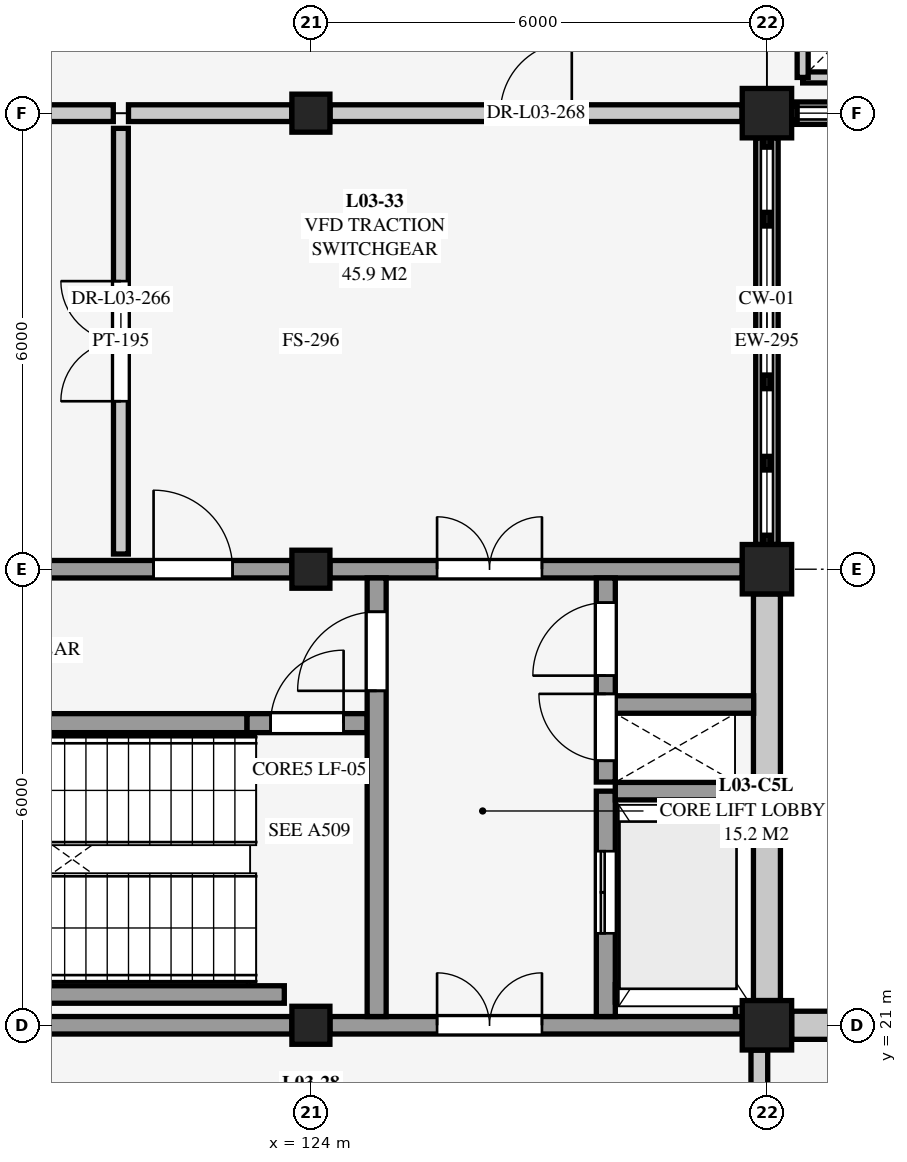
"""IFC4 building model, lengths in metres.
Left out: names, types, materials, properties, quantities, classifications, styles, units other than length and angle.
Written with IfcOpenShell. Run it as: python <this file> out.ifc"""

import sys

from ifc_helpers import new_model, si_unit, direction, frame, frame_2d, origin, origin_2d, place, context, subcontext, project, spatial, rectangle, extrude, element, fill, save


model = new_model("IFC4")
c1 = context("Model", 3, precision=1e-05, world=origin(), true_north=direction((0.0, 1.0)))
c2 = subcontext(c1, "Body", "Model", "MODEL_VIEW")
j1 = project(units=[si_unit("LENGTHUNIT", "METRE"), si_unit("PLANEANGLEUNIT", "RADIAN")], contexts=[c1])
p1 = place(None, origin())
s1 = spatial("IfcSite", under=j1, at=p1, CompositionType="ELEMENT")
p2 = place(p1, origin())
s2 = spatial("IfcBuilding", under=s1, at=p2, CompositionType="ELEMENT")
p3 = place(p2, frame((0.0, 0.0, 9.0)))
s3 = spatial("IfcBuildingStorey", under=s2, at=p3, CompositionType="ELEMENT", Elevation=9.0)
for number, where, z_axis, x_axis in (
    (1, (124.0, 21.0, 0.0), (0.0, 0.0, 1.0), (1.0, 0.0, 0.0)),
    (2, (124.0, 27.0, 0.0), (0.0, 0.0, 1.0), (1.0, 0.0, 0.0)),
    (3, (124.0, 33.0, 0.0), (0.0, 0.0, 1.0), (1.0, 0.0, 0.0)),
):
    element("IfcColumn", number, at=place(p3, frame(where, z_axis=z_axis, x_axis=x_axis)), inside=s3, PredefinedType="COLUMN", context=c2, shape_type="SweptSolid", body=[
        extrude(rectangle(XDim=0.5, YDim=0.5, at=origin_2d()), origin(), (0.0, 0.0, 1.0), 4.5),
    ])
for number, where, z_axis, x_axis in (
    (4, (130.0, 21.0, 0.0), (0.0, 0.0, 1.0), (1.0, 0.0, 0.0)),
    (5, (130.0, 27.0, 0.0), (0.0, 0.0, 1.0), (1.0, 0.0, 0.0)),
    (6, (130.0, 33.0, 0.0), (0.0, 0.0, 1.0), (1.0, 0.0, 0.0)),
):
    element("IfcColumn", number, at=place(p3, frame(where, z_axis=z_axis, x_axis=x_axis)), inside=s3, PredefinedType="COLUMN", context=c2, shape_type="SweptSolid", body=[
        extrude(rectangle(XDim=0.65, YDim=0.65, at=origin_2d()), origin(), (0.0, 0.0, 1.0), 4.5),
    ])
p4 = place(p3, frame((130.325, 21.0, 0.0), z_axis=(0.0, 0.0, 1.0), x_axis=(1.0, 0.0, 0.0)))
e7 = element("IfcWall", 7, at=p4, inside=s3, PredefinedType="SOLIDWALL", context=c2, shape_type="SweptSolid", body=[
    extrude(rectangle(XDim=5.375, YDim=0.37, at=frame_2d((2.688, 0.0))), origin(), (0.0, 0.0, 1.0), 3.778),
])
p5 = place(p4, frame((1.962, 0.0, 0.75)))
e8 = element("IfcOpeningElement", 8, at=p5, cuts=e7, PredefinedType="OPENING", context=c2, shape_type="SweptSolid", body=[
    extrude(rectangle(XDim=1.45, YDim=2.25, at=frame_2d((0.725, 1.125))), frame((0.0, 0.195, 0.0), z_axis=(0.0, -1.0, 0.0), x_axis=(1.0, 0.0, 0.0)), (0.0, 0.0, 1.0), 0.39),
])
p6 = place(p3, frame((130.0, 26.675, 0.0), z_axis=(0.0, 0.0, 1.0), x_axis=(0.0, -1.0, 0.0)))
e9 = element("IfcWall", 9, at=p6, inside=s3, PredefinedType="SOLIDWALL", context=c2, shape_type="SweptSolid", body=[
    extrude(rectangle(XDim=5.35, YDim=0.355, at=frame_2d((2.675, 0.0))), origin(), (0.0, 0.0, 1.0), 3.778),
])
p7 = place(p3, frame((130.0, 32.675, 0.0), z_axis=(0.0, 0.0, 1.0), x_axis=(0.0, -1.0, 0.0)))
e10 = element("IfcWall", 10, at=p7, inside=s3, PredefinedType="SOLIDWALL", context=c2, shape_type="SweptSolid", body=[
    extrude(rectangle(XDim=5.35, YDim=0.295, at=frame_2d((2.675, 0.0))), origin(), (0.0, 0.0, 1.0), 0.16),
])
p8 = place(p3, frame((135.675, 33.0, 0.0), z_axis=(0.0, 0.0, 1.0), x_axis=(-1.0, 0.0, 0.0)))
e11 = element("IfcWall", 11, at=p8, inside=s3, PredefinedType="SOLIDWALL", context=c2, shape_type="SweptSolid", body=[
    extrude(rectangle(XDim=5.35, YDim=0.295, at=frame_2d((2.675, 0.0))), origin(), (0.0, 0.0, 1.0), 0.21),
])
for number, where, z_axis, x_axis in (
    (12, (130.47, 33.47, 0.0), (0.0, 0.0, 1.0), (1.0, 0.0, 0.0)),
    (13, (130.47, 34.43, 0.0), (0.0, 0.0, 1.0), (0.0, -1.0, 0.0)),
):
    element("IfcWall", number, at=place(p3, frame(where, z_axis=z_axis, x_axis=x_axis)), inside=s3, PredefinedType="PARTITIONING", context=c2, shape_type="SweptSolid", body=[
        extrude(rectangle(XDim=0.96, YDim=0.145, at=frame_2d((0.48, 0.0))), origin(), (0.0, 0.0, 1.0), 4.3),
    ])
p9 = place(p3, frame((118.275, 21.0, 0.0), z_axis=(0.0, 0.0, 1.0), x_axis=(1.0, 0.0, 0.0)))
e14 = element("IfcWall", 14, at=p9, inside=s3, PredefinedType="SHEAR", context=c2, shape_type="SweptSolid", body=[
    extrude(rectangle(XDim=5.475, YDim=0.23, at=frame_2d((2.738, 0.0))), origin(), (0.0, 0.0, 1.0), 4.185),
])
p10 = place(p3, frame((124.25, 21.0, 0.0), z_axis=(0.0, 0.0, 1.0), x_axis=(1.0, 0.0, 0.0)))
e15 = element("IfcWall", 15, at=p10, inside=s3, PredefinedType="SHEAR", context=c2, shape_type="SweptSolid", body=[
    extrude(rectangle(XDim=5.425, YDim=0.23, at=frame_2d((2.712, 0.0))), origin(), (0.0, 0.0, 1.0), 4.185),
])
p11 = place(p10, frame((1.41, 0.0, 0.0)))
e16 = element("IfcOpeningElement", 16, at=p11, cuts=e15, PredefinedType="OPENING", context=c2, shape_type="SweptSolid", body=[
    extrude(rectangle(XDim=1.38, YDim=2.16, at=frame_2d((0.69, 1.08))), frame((0.0, 0.125, 0.0), z_axis=(0.0, -1.0, 0.0), x_axis=(1.0, 0.0, 0.0)), (0.0, 0.0, 1.0), 0.25),
])
p12 = place(p3, frame((118.275, 27.0, 0.0), z_axis=(0.0, 0.0, 1.0), x_axis=(1.0, 0.0, 0.0)))
e17 = element("IfcWall", 17, at=p12, inside=s3, PredefinedType="SHEAR", context=c2, shape_type="SweptSolid", body=[
    extrude(rectangle(XDim=5.475, YDim=0.23, at=frame_2d((2.738, 0.0))), origin(), (0.0, 0.0, 1.0), 4.185),
])
p13 = place(p12, frame((3.655, 0.0, 0.0)))
e18 = element("IfcOpeningElement", 18, at=p13, cuts=e17, PredefinedType="OPENING", context=c2, shape_type="SweptSolid", body=[
    extrude(rectangle(XDim=1.04, YDim=2.14, at=frame_2d((0.52, 1.07))), frame((0.0, 0.125, 0.0), z_axis=(0.0, -1.0, 0.0), x_axis=(1.0, 0.0, 0.0)), (0.0, 0.0, 1.0), 0.25),
])
p14 = place(p3, frame((124.25, 27.0, 0.0), z_axis=(0.0, 0.0, 1.0), x_axis=(1.0, 0.0, 0.0)))
e19 = element("IfcWall", 19, at=p14, inside=s3, PredefinedType="SHEAR", context=c2, shape_type="SweptSolid", body=[
    extrude(rectangle(XDim=5.425, YDim=0.23, at=frame_2d((2.712, 0.0))), origin(), (0.0, 0.0, 1.0), 4.185),
])
p15 = place(p14, frame((1.41, 0.0, 0.0)))
e20 = element("IfcOpeningElement", 20, at=p15, cuts=e19, PredefinedType="OPENING", context=c2, shape_type="SweptSolid", body=[
    extrude(rectangle(XDim=1.38, YDim=2.16, at=frame_2d((0.69, 1.08))), frame((0.0, 0.125, 0.0), z_axis=(0.0, -1.0, 0.0), x_axis=(1.0, 0.0, 0.0)), (0.0, 0.0, 1.0), 0.25),
])
p16 = place(p3, frame((118.52, 21.405, 0.0), z_axis=(0.0, 0.0, 1.0), x_axis=(1.0, 0.0, 0.0)))
e21 = element("IfcWall", 21, at=p16, inside=s3, PredefinedType="SHEAR", context=c2, shape_type="SweptSolid", body=[
    extrude(rectangle(XDim=5.13, YDim=0.23, at=frame_2d((2.565, 0.0))), origin(), (0.0, 0.0, 1.0), 4.5),
])
p17 = place(p3, frame((118.29, 24.975, 0.0), z_axis=(0.0, 0.0, 1.0), x_axis=(1.0, 0.0, 0.0)))
e22 = element("IfcWall", 22, at=p17, inside=s3, PredefinedType="SHEAR", context=c2, shape_type="SweptSolid", body=[
    extrude(rectangle(XDim=4.87, YDim=0.25, at=frame_2d((2.435, 0.0))), origin(), (0.0, 0.0, 1.0), 4.5),
])
p18 = place(p3, frame((123.16, 24.975, 0.0), z_axis=(0.0, 0.0, 1.0), x_axis=(1.0, 0.0, 0.0)))
e23 = element("IfcWall", 23, at=p18, inside=s3, PredefinedType="SHEAR", context=c2, shape_type="SweptSolid", body=[
    extrude(rectangle(XDim=1.58, YDim=0.25, at=frame_2d((0.79, 0.0))), origin(), (0.0, 0.0, 1.0), 4.185),
])
p19 = place(p18, frame((0.31, 0.0, 0.0)))
e24 = element("IfcOpeningElement", 24, at=p19, cuts=e23, PredefinedType="OPENING", context=c2, shape_type="SweptSolid", body=[
    extrude(rectangle(XDim=0.96, YDim=2.12, at=frame_2d((0.48, 1.06))), frame((0.0, 0.135, 0.0), z_axis=(0.0, -1.0, 0.0), x_axis=(1.0, 0.0, 0.0)), (0.0, 0.0, 1.0), 0.27),
])
p20 = place(p3, frame((124.865, 21.115, 0.0), z_axis=(0.0, 0.0, 1.0), x_axis=(0.0, 1.0, 0.0)))
e25 = element("IfcWall", 25, at=p20, inside=s3, PredefinedType="SHEAR", context=c2, shape_type="SweptSolid", body=[
    extrude(rectangle(XDim=5.77, YDim=0.25, at=frame_2d((2.885, 0.0))), origin(), (0.0, 0.0, 1.0), 4.185),
])
p21 = place(p20, frame((4.285, 0.0, 0.0)))
e26 = element("IfcOpeningElement", 26, at=p21, cuts=e25, PredefinedType="OPENING", context=c2, shape_type="SweptSolid", body=[
    extrude(rectangle(XDim=1.04, YDim=2.14, at=frame_2d((0.52, 1.07))), frame((0.0, 0.135, 0.0), z_axis=(0.0, -1.0, 0.0), x_axis=(1.0, 0.0, 0.0)), (0.0, 0.0, 1.0), 0.27),
])
p22 = place(p3, frame((127.88, 21.115, 0.0), z_axis=(0.0, 0.0, 1.0), x_axis=(0.0, 1.0, 0.0)))
e27 = element("IfcWall", 27, at=p22, inside=s3, PredefinedType="SHEAR", context=c2, shape_type="SweptSolid", body=[
    extrude(rectangle(XDim=2.965, YDim=0.25, at=frame_2d((1.482, 0.0))), origin(), (0.0, 0.0, 1.0), 4.5),
])
p23 = place(p22, frame((1.095, 0.0, 0.0)))
e28 = element("IfcOpeningElement", 28, at=p23, cuts=e27, PredefinedType="OPENING", context=c2, shape_type="SweptSolid", body=[
    extrude(rectangle(XDim=1.08, YDim=2.15, at=frame_2d((0.54, 1.075))), frame((0.0, 0.135, 0.0), z_axis=(0.0, -1.0, 0.0), x_axis=(1.0, 0.0, 0.0)), (0.0, 0.0, 1.0), 0.27),
])
p24 = place(p3, frame((128.005, 21.42, 0.0), z_axis=(0.0, 0.0, 1.0), x_axis=(1.0, 0.0, 0.0)))
e29 = element("IfcWall", 29, at=p24, inside=s3, PredefinedType="SHEAR", context=c2, shape_type="SweptSolid", body=[
    extrude(rectangle(XDim=1.58, YDim=0.23, at=frame_2d((0.79, 0.0))), origin(), (0.0, 0.0, 1.0), 4.5),
])
p25 = place(p3, frame((129.7, 21.115, 0.0), z_axis=(0.0, 0.0, 1.0), x_axis=(0.0, 1.0, 0.0)))
e30 = element("IfcWall", 30, at=p25, inside=s3, PredefinedType="SHEAR", context=c2, shape_type="SweptSolid", body=[
    extrude(rectangle(XDim=2.965, YDim=0.23, at=frame_2d((1.482, 0.0))), origin(), (0.0, 0.0, 1.0), 4.5),
])
p26 = place(p3, frame((128.005, 24.08, 0.0), z_axis=(0.0, 0.0, 1.0), x_axis=(1.0, 0.0, 0.0)))
e31 = element("IfcWall", 31, at=p26, inside=s3, PredefinedType="SHEAR", context=c2, shape_type="SweptSolid", body=[
    extrude(rectangle(XDim=1.58, YDim=0.23, at=frame_2d((0.79, 0.0))), origin(), (0.0, 0.0, 1.0), 4.5),
])
p27 = place(p3, frame((127.88, 24.2, 0.0), z_axis=(0.0, 0.0, 1.0), x_axis=(0.0, 1.0, 0.0)))
e32 = element("IfcWall", 32, at=p27, inside=s3, PredefinedType="SHEAR", context=c2, shape_type="SweptSolid", body=[
    extrude(rectangle(XDim=2.685, YDim=0.25, at=frame_2d((1.343, 0.0))), origin(), (0.0, 0.0, 1.0), 4.185),
])
p28 = place(p27, frame((0.28, 0.0, 0.0)))
e33 = element("IfcOpeningElement", 33, at=p28, cuts=e32, PredefinedType="OPENING", context=c2, shape_type="SweptSolid", body=[
    extrude(rectangle(XDim=0.88, YDim=2.08, at=frame_2d((0.44, 1.04))), frame((0.0, 0.135, 0.0), z_axis=(0.0, -1.0, 0.0), x_axis=(1.0, 0.0, 0.0)), (0.0, 0.0, 1.0), 0.27),
])
p29 = place(p27, frame((1.4, 0.0, 0.0)))
e34 = element("IfcOpeningElement", 34, at=p29, cuts=e32, PredefinedType="OPENING", context=c2, shape_type="SweptSolid", body=[
    extrude(rectangle(XDim=0.96, YDim=2.12, at=frame_2d((0.48, 1.06))), frame((0.0, 0.135, 0.0), z_axis=(0.0, -1.0, 0.0), x_axis=(1.0, 0.0, 0.0)), (0.0, 0.0, 1.0), 0.27),
])
p30 = place(p3, frame((128.005, 25.22, 0.0), z_axis=(0.0, 0.0, 1.0), x_axis=(1.0, 0.0, 0.0)))
e35 = element("IfcWall", 35, at=p30, inside=s3, PredefinedType="SHEAR", context=c2, shape_type="SweptSolid", body=[
    extrude(rectangle(XDim=1.82, YDim=0.23, at=frame_2d((0.91, 0.0))), origin(), (0.0, 0.0, 1.0), 4.185),
])
p31 = place(p3, frame((129.9, 17.8, 0.0), z_axis=(0.0, 0.0, 1.0), x_axis=(0.0, 1.0, 0.0)))
e36 = element("IfcWall", 36, at=p31, inside=s3, PredefinedType="SOLIDWALL", context=c2, shape_type="SweptSolid", body=[
    extrude(rectangle(XDim=2.873, YDim=0.22, at=frame_2d((1.437, 0.0))), origin(), (0.0, 0.0, 1.0), 4.24),
])
p32 = place(p31, frame((0.967, 0.0, 0.0)))
e37 = element("IfcOpeningElement", 37, at=p32, cuts=e36, PredefinedType="OPENING", context=c2, shape_type="SweptSolid", body=[
    extrude(rectangle(XDim=0.94, YDim=2.1, at=frame_2d((0.47, 1.05))), frame((0.0, 0.12, 0.0), z_axis=(0.0, -1.0, 0.0), x_axis=(1.0, 0.0, 0.0)), (0.0, 0.0, 1.0), 0.24),
])
p33 = place(p3, frame((121.5, 27.2, 0.0), z_axis=(0.0, 0.0, 1.0), x_axis=(0.0, 1.0, 0.0)))
e38 = element("IfcWall", 38, at=p33, inside=s3, PredefinedType="PARTITIONING", context=c2, shape_type="SweptSolid", body=[
    extrude(rectangle(XDim=5.6, YDim=0.195, at=frame_2d((2.8, 0.0))), origin(), (0.0, 0.0, 1.0), 4.185),
])
p34 = place(p33, frame((2.01, 0.0, 0.0)))
e39 = element("IfcOpeningElement", 39, at=p34, cuts=e38, PredefinedType="OPENING", context=c2, shape_type="SweptSolid", body=[
    extrude(rectangle(XDim=1.58, YDim=2.2, at=frame_2d((0.79, 1.1))), frame((0.0, 0.108, 0.0), z_axis=(0.0, -1.0, 0.0), x_axis=(1.0, 0.0, 0.0)), (0.0, 0.0, 1.0), 0.215),
])
p35 = place(p3, frame((118.277, 33.0, 0.0), z_axis=(0.0, 0.0, 1.0), x_axis=(1.0, 0.0, 0.0)))
e40 = element("IfcWall", 40, at=p35, inside=s3, PredefinedType="SOLIDWALL", context=c2, shape_type="SweptSolid", body=[
    extrude(rectangle(XDim=3.123, YDim=0.22, at=frame_2d((1.562, 0.0))), origin(), (0.0, 0.0, 1.0), 3.568),
])
p36 = place(p35, frame((1.092, 0.0, 0.0)))
e41 = element("IfcOpeningElement", 41, at=p36, cuts=e40, PredefinedType="OPENING", context=c2, shape_type="SweptSolid", body=[
    extrude(rectangle(XDim=0.94, YDim=2.1, at=frame_2d((0.47, 1.05))), frame((0.0, 0.12, 0.0), z_axis=(0.0, -1.0, 0.0), x_axis=(1.0, 0.0, 0.0)), (0.0, 0.0, 1.0), 0.24),
])
p37 = place(p3, frame((124.252, 33.0, 0.0), z_axis=(0.0, 0.0, 1.0), x_axis=(1.0, 0.0, 0.0)))
e42 = element("IfcWall", 42, at=p37, inside=s3, PredefinedType="SOLIDWALL", context=c2, shape_type="SweptSolid", body=[
    extrude(rectangle(XDim=5.421, YDim=0.22, at=frame_2d((2.71, 0.0))), origin(), (0.0, 0.0, 1.0), 3.568),
])
p38 = place(p37, frame((2.24, 0.0, 0.0)))
e43 = element("IfcOpeningElement", 43, at=p38, cuts=e42, PredefinedType="OPENING", context=c2, shape_type="SweptSolid", body=[
    extrude(rectangle(XDim=0.94, YDim=2.1, at=frame_2d((0.47, 1.05))), frame((0.0, 0.12, 0.0), z_axis=(0.0, -1.0, 0.0), x_axis=(1.0, 0.0, 0.0)), (0.0, 0.0, 1.0), 0.24),
])
p39 = place(p3, frame((121.6, 33.0, 0.0), z_axis=(0.0, 0.0, 1.0), x_axis=(1.0, 0.0, 0.0)))
e44 = element("IfcWall", 44, at=p39, inside=s3, PredefinedType="SOLIDWALL", context=c2, shape_type="SweptSolid", body=[
    extrude(rectangle(XDim=2.148, YDim=0.22, at=frame_2d((1.074, 0.0))), origin(), (0.0, 0.0, 1.0), 3.568),
])
p40 = place(p11, origin())
e45 = element("IfcDoor", 45, at=p40, inside=s3, OperationType="DOUBLE_DOOR_SINGLE_SWING", PredefinedType="DOOR", context=c2, shape_type="SweptSolid", body=[
    extrude(rectangle(XDim=1.38, YDim=2.16, at=frame_2d((0.69, 1.08))), frame((0.0, 0.025, 0.0), z_axis=(0.0, -1.0, 0.0), x_axis=(1.0, 0.0, 0.0)), (0.0, 0.0, 1.0), 0.05),
])
fill(e16, e45)
p41 = place(p13, origin())
e46 = element("IfcDoor", 46, at=p41, inside=s3, OperationType="SINGLE_SWING_LEFT", PredefinedType="DOOR", context=c2, shape_type="SweptSolid", body=[
    extrude(rectangle(XDim=1.04, YDim=2.14, at=frame_2d((0.52, 1.07))), frame((0.0, 0.025, 0.0), z_axis=(0.0, -1.0, 0.0), x_axis=(1.0, 0.0, 0.0)), (0.0, 0.0, 1.0), 0.05),
])
fill(e18, e46)
p42 = place(p15, origin())
e47 = element("IfcDoor", 47, at=p42, inside=s3, OperationType="DOUBLE_DOOR_SINGLE_SWING", PredefinedType="DOOR", context=c2, shape_type="SweptSolid", body=[
    extrude(rectangle(XDim=1.38, YDim=2.16, at=frame_2d((0.69, 1.08))), frame((0.0, 0.025, 0.0), z_axis=(0.0, -1.0, 0.0), x_axis=(1.0, 0.0, 0.0)), (0.0, 0.0, 1.0), 0.05),
])
fill(e20, e47)
p43 = place(p19, origin())
e48 = element("IfcDoor", 48, at=p43, inside=s3, OperationType="SINGLE_SWING_RIGHT", PredefinedType="DOOR", context=c2, shape_type="SweptSolid", body=[
    extrude(rectangle(XDim=0.96, YDim=2.12, at=frame_2d((0.48, 1.06))), frame((0.0, 0.025, 0.0), z_axis=(0.0, -1.0, 0.0), x_axis=(1.0, 0.0, 0.0)), (0.0, 0.0, 1.0), 0.05),
])
fill(e24, e48)
p44 = place(p21, origin())
e49 = element("IfcDoor", 49, at=p44, inside=s3, OperationType="SINGLE_SWING_LEFT", PredefinedType="DOOR", context=c2, shape_type="SweptSolid", body=[
    extrude(rectangle(XDim=1.04, YDim=2.14, at=frame_2d((0.52, 1.07))), frame((0.0, 0.025, 0.0), z_axis=(0.0, -1.0, 0.0), x_axis=(1.0, 0.0, 0.0)), (0.0, 0.0, 1.0), 0.05),
])
fill(e26, e49)
p45 = place(p23, origin())
e50 = element("IfcDoor", 50, at=p45, inside=s3, OperationType="DOUBLE_DOOR_SLIDING", PredefinedType="DOOR", context=c2, shape_type="SweptSolid", body=[
    extrude(rectangle(XDim=1.08, YDim=2.15, at=frame_2d((0.54, 1.075))), frame((0.0, 0.025, 0.0), z_axis=(0.0, -1.0, 0.0), x_axis=(1.0, 0.0, 0.0)), (0.0, 0.0, 1.0), 0.05),
])
fill(e28, e50)
p46 = place(p28, origin())
e51 = element("IfcDoor", 51, at=p46, inside=s3, OperationType="SINGLE_SWING_RIGHT", PredefinedType="DOOR", context=c2, shape_type="SweptSolid", body=[
    extrude(rectangle(XDim=0.88, YDim=2.08, at=frame_2d((0.44, 1.04))), frame((0.0, 0.025, 0.0), z_axis=(0.0, -1.0, 0.0), x_axis=(1.0, 0.0, 0.0)), (0.0, 0.0, 1.0), 0.05),
])
fill(e33, e51)
p47 = place(p29, origin())
e52 = element("IfcDoor", 52, at=p47, inside=s3, OperationType="SINGLE_SWING_LEFT", PredefinedType="DOOR", context=c2, shape_type="SweptSolid", body=[
    extrude(rectangle(XDim=0.96, YDim=2.12, at=frame_2d((0.48, 1.06))), frame((0.0, 0.025, 0.0), z_axis=(0.0, -1.0, 0.0), x_axis=(1.0, 0.0, 0.0)), (0.0, 0.0, 1.0), 0.05),
])
fill(e34, e52)
p48 = place(p34, origin())
e53 = element("IfcDoor", 53, at=p48, inside=s3, OperationType="DOUBLE_DOOR_SINGLE_SWING", PredefinedType="DOOR", context=c2, shape_type="SweptSolid", body=[
    extrude(rectangle(XDim=1.58, YDim=2.2, at=frame_2d((0.79, 1.1))), frame((0.0, 0.025, 0.0), z_axis=(0.0, -1.0, 0.0), x_axis=(1.0, 0.0, 0.0)), (0.0, 0.0, 1.0), 0.05),
])
fill(e39, e53)
p49 = place(p38, origin())
e54 = element("IfcDoor", 54, at=p49, inside=s3, OperationType="SINGLE_SWING_RIGHT", PredefinedType="DOOR", context=c2, shape_type="SweptSolid", body=[
    extrude(rectangle(XDim=0.94, YDim=2.1, at=frame_2d((0.47, 1.05))), frame((0.0, 0.025, 0.0), z_axis=(0.0, -1.0, 0.0), x_axis=(1.0, 0.0, 0.0)), (0.0, 0.0, 1.0), 0.05),
])
fill(e43, e54)
save(model, sys.argv[1])
